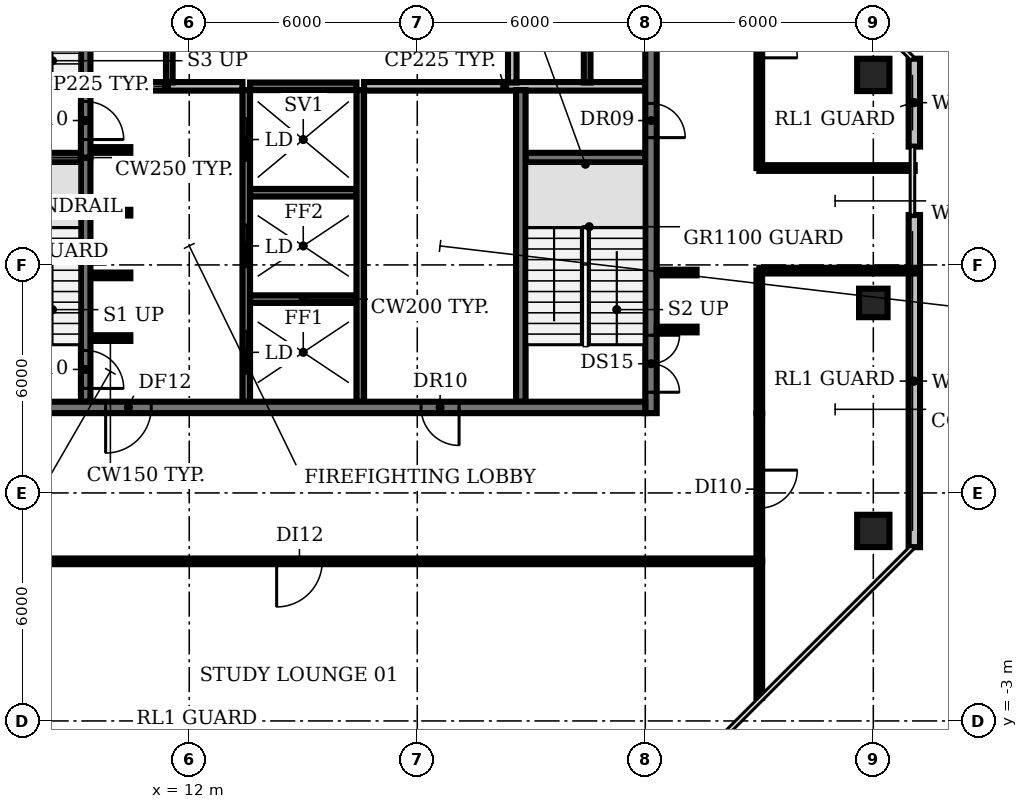
"""IFC4 building model, lengths in metres.
Left out: names, types, materials, properties, quantities, classifications, styles, units other than length and angle.
Written with IfcOpenShell. Run it as: python <this file> out.ifc"""

import sys

from ifc_helpers import new_model, si_unit, direction, frame, frame_2d, origin, origin_2d, place, context, subcontext, project, spatial, rectangle, circle, extrude, element, fill, save


model = new_model("IFC4")
c1 = context("Model", 3, precision=1e-05, world=origin(), true_north=direction((0.0, 1.0)))
c2 = subcontext(c1, "Body", "Model", "MODEL_VIEW")
j1 = project(units=[si_unit("LENGTHUNIT", "METRE"), si_unit("PLANEANGLEUNIT", "RADIAN")], contexts=[c1])
p1 = place(None, origin())
s1 = spatial("IfcSite", under=j1, at=p1, CompositionType="ELEMENT")
p2 = place(p1, origin())
s2 = spatial("IfcBuilding", under=s1, at=p2, CompositionType="ELEMENT")
p3 = place(p2, frame((0.0, 0.0, 285.2)))
s3 = spatial("IfcBuildingStorey", under=s2, at=p3, CompositionType="ELEMENT", Elevation=285.2)
p4 = place(p3, frame((30.0, 2.0, 0.0), z_axis=(0.0, 0.0, 1.0), x_axis=(1.0, 0.0, 0.0)))
e1 = element("IfcColumn", 1, at=p4, inside=s3, PredefinedType="COLUMN", context=c2, shape_type="SweptSolid", body=[
    extrude(circle(Radius=0.425, at=origin_2d()), origin(), (0.0, 0.0, 1.0), 3.85),
])
p5 = place(p3, frame((30.0, 8.0, 0.0), z_axis=(0.0, 0.0, 1.0), x_axis=(1.0, 0.0, 0.0)))
e2 = element("IfcColumn", 2, at=p5, inside=s3, PredefinedType="COLUMN", context=c2, shape_type="SweptSolid", body=[
    extrude(rectangle(XDim=0.75, YDim=0.75, at=origin_2d()), origin(), (0.0, 0.0, 1.0), 3.85),
])
p6 = place(p3, frame((30.0, 14.0, 0.0), z_axis=(0.0, 0.0, 1.0), x_axis=(1.0, 0.0, 0.0)))
e3 = element("IfcColumn", 3, at=p6, inside=s3, PredefinedType="COLUMN", context=c2, shape_type="SweptSolid", body=[
    extrude(circle(Radius=0.425, at=origin_2d()), origin(), (0.0, 0.0, 1.0), 3.85),
])
p7 = place(p3, frame((31.08, 1.573, 0.0), z_axis=(0.0, 0.0, 1.0), x_axis=(0.0, 1.0, 0.0)))
e4 = element("IfcWall", 4, at=p7, inside=s3, PredefinedType="SOLIDWALL", context=c2, shape_type="SweptSolid", body=[
    extrude(rectangle(XDim=8.74, YDim=0.3, at=frame_2d((4.37, 0.0))), origin(), (0.0, 0.0, 1.0), 3.85),
])
p8 = place(p3, frame((31.08, 12.113, 0.0), z_axis=(0.0, 0.0, 1.0), x_axis=(0.0, 1.0, 0.0)))
e5 = element("IfcWall", 5, at=p8, inside=s3, PredefinedType="SOLIDWALL", context=c2, shape_type="SweptSolid", body=[
    extrude(rectangle(XDim=2.313, YDim=0.3, at=frame_2d((1.157, 0.0))), origin(), (0.0, 0.0, 1.0), 3.85),
])
p9 = place(p3, frame((9.4, 7.075, 0.0), z_axis=(0.0, 0.0, 1.0), x_axis=(1.0, 0.0, 0.0)))
e6 = element("IfcWall", 6, at=p9, inside=s3, PredefinedType="SHEAR", context=c2, shape_type="SweptSolid", body=[
    extrude(rectangle(XDim=1.05, YDim=0.15, at=frame_2d((0.525, 0.0))), origin(), (0.0, 0.0, 1.0), 3.85),
])
p10 = place(p3, frame((13.6, 8.1, 0.0), z_axis=(0.0, 0.0, 1.0), x_axis=(1.0, 0.0, 0.0)))
e7 = element("IfcWall", 7, at=p10, inside=s3, PredefinedType="SHEAR", context=c2, shape_type="SweptSolid", body=[
    extrude(rectangle(XDim=2.8, YDim=0.2, at=frame_2d((1.4, 0.0))), origin(), (0.0, 0.0, 1.0), 3.85),
])
for number, where, z_axis, x_axis in (
    (8, (9.4, 8.725, 0.0), (0.0, 0.0, 1.0), (1.0, 0.0, 0.0)),
    (9, (9.4, 10.375, 0.0), (0.0, 0.0, 1.0), (1.0, 0.0, 0.0)),
):
    element("IfcWall", number, at=place(p3, frame(where, z_axis=z_axis, x_axis=x_axis)), inside=s3, PredefinedType="SHEAR", context=c2, shape_type="SweptSolid", body=[
        extrude(rectangle(XDim=1.05, YDim=0.15, at=frame_2d((0.525, 0.0))), origin(), (0.0, 0.0, 1.0), 3.85),
    ])
p11 = place(p3, frame((13.6, 10.9, 0.0), z_axis=(0.0, 0.0, 1.0), x_axis=(1.0, 0.0, 0.0)))
e10 = element("IfcWall", 10, at=p11, inside=s3, PredefinedType="SHEAR", context=c2, shape_type="SweptSolid", body=[
    extrude(rectangle(XDim=2.8, YDim=0.2, at=frame_2d((1.4, 0.0))), origin(), (0.0, 0.0, 1.0), 3.85),
])
for number, where, z_axis, x_axis in (
    (11, (6.0, 11.825, 0.0), (0.0, 0.0, 1.0), (1.0, 0.0, 0.0)),
    (12, (20.85, 11.825, 0.0), (0.0, 0.0, 1.0), (1.0, 0.0, 0.0)),
):
    element("IfcWall", number, at=place(p3, frame(where, z_axis=z_axis, x_axis=x_axis)), inside=s3, PredefinedType="SHEAR", context=c2, shape_type="SweptSolid", body=[
        extrude(rectangle(XDim=3.15, YDim=0.25, at=frame_2d((1.575, 0.0))), origin(), (0.0, 0.0, 1.0), 3.85),
    ])
p12 = place(p3, frame((9.4, 12.025, 0.0), z_axis=(0.0, 0.0, 1.0), x_axis=(1.0, 0.0, 0.0)))
e13 = element("IfcWall", 13, at=p12, inside=s3, PredefinedType="SHEAR", context=c2, shape_type="SweptSolid", body=[
    extrude(rectangle(XDim=1.05, YDim=0.15, at=frame_2d((0.525, 0.0))), origin(), (0.0, 0.0, 1.0), 3.85),
])
p13 = place(p3, frame((9.4, 13.7, 0.0), z_axis=(0.0, 0.0, 1.0), x_axis=(1.0, 0.0, 0.0)))
e14 = element("IfcWall", 14, at=p13, inside=s3, PredefinedType="PARTITIONING", context=c2, shape_type="SweptSolid", body=[
    extrude(rectangle(XDim=4.0, YDim=0.225, at=frame_2d((2.0, 0.0))), origin(), (0.0, 0.0, 1.0), 3.85),
])
p14 = place(p3, frame((13.6, 13.7, 0.0), z_axis=(0.0, 0.0, 1.0), x_axis=(1.0, 0.0, 0.0)))
e15 = element("IfcWall", 15, at=p14, inside=s3, PredefinedType="SHEAR", context=c2, shape_type="SweptSolid", body=[
    extrude(rectangle(XDim=2.8, YDim=0.2, at=frame_2d((1.4, 0.0))), origin(), (0.0, 0.0, 1.0), 3.85),
])
p15 = place(p3, frame((16.6, 13.7, 0.0), z_axis=(0.0, 0.0, 1.0), x_axis=(1.0, 0.0, 0.0)))
e16 = element("IfcWall", 16, at=p15, inside=s3, PredefinedType="PARTITIONING", context=c2, shape_type="SweptSolid", body=[
    extrude(rectangle(XDim=7.4, YDim=0.225, at=frame_2d((3.7, 0.0))), origin(), (0.0, 0.0, 1.0), 3.85),
])
p16 = place(p3, frame((9.275, 11.825, 0.0), z_axis=(0.0, 0.0, 1.0), x_axis=(0.0, -1.0, 0.0)))
e17 = element("IfcWall", 17, at=p16, inside=s3, PredefinedType="SHEAR", context=c2, shape_type="SweptSolid", body=[
    extrude(rectangle(XDim=6.425, YDim=0.25, at=frame_2d((3.212, 0.0))), origin(), (0.0, 0.0, 1.0), 3.85),
])
p17 = place(p16, frame((5.075, 0.0, 0.0)))
e18 = element("IfcOpeningElement", 18, at=p17, cuts=e17, PredefinedType="OPENING", context=c2, shape_type="SweptSolid", body=[
    extrude(rectangle(XDim=1.0, YDim=2.1, at=frame_2d((0.5, 1.05))), frame((0.0, 0.135, 0.0), z_axis=(0.0, -1.0, 0.0), x_axis=(1.0, 0.0, 0.0)), (0.0, 0.0, 1.0), 0.27),
])
p18 = place(p3, frame((9.275, 18.375, 0.0), z_axis=(0.0, 0.0, 1.0), x_axis=(0.0, -1.0, 0.0)))
e19 = element("IfcWall", 19, at=p18, inside=s3, PredefinedType="SHEAR", context=c2, shape_type="SweptSolid", body=[
    extrude(rectangle(XDim=6.55, YDim=0.25, at=frame_2d((3.275, 0.0))), origin(), (0.0, 0.0, 1.0), 3.85),
])
p19 = place(p18, frame((5.075, 0.0, 0.0)))
e20 = element("IfcOpeningElement", 20, at=p19, cuts=e19, PredefinedType="OPENING", context=c2, shape_type="SweptSolid", body=[
    extrude(rectangle(XDim=1.0, YDim=2.1, at=frame_2d((0.5, 1.05))), frame((0.0, 0.135, 0.0), z_axis=(0.0, -1.0, 0.0), x_axis=(1.0, 0.0, 0.0)), (0.0, 0.0, 1.0), 0.27),
])
p20 = place(p3, frame((11.475, 13.8, 0.0), z_axis=(0.0, 0.0, 1.0), x_axis=(0.0, 1.0, 0.0)))
e21 = element("IfcWall", 21, at=p20, inside=s3, PredefinedType="PARTITIONING", context=c2, shape_type="SweptSolid", body=[
    extrude(rectangle(XDim=2.6, YDim=0.175, at=frame_2d((1.3, 0.0))), origin(), (0.0, 0.0, 1.0), 3.85),
])
p21 = place(p3, frame((13.5, 5.4, 0.0), z_axis=(0.0, 0.0, 1.0), x_axis=(0.0, 1.0, 0.0)))
e22 = element("IfcWall", 22, at=p21, inside=s3, PredefinedType="SHEAR", context=c2, shape_type="SweptSolid", body=[
    extrude(rectangle(XDim=8.2, YDim=0.2, at=frame_2d((4.1, 0.0))), origin(), (0.0, 0.0, 1.0), 3.85),
])
p22 = place(p21, frame((0.75, 0.0, 0.0)))
e23 = element("IfcOpeningElement", 23, at=p22, cuts=e22, PredefinedType="OPENING", context=c2, shape_type="SweptSolid", body=[
    extrude(rectangle(XDim=1.1, YDim=2.1, at=frame_2d((0.55, 1.05))), frame((0.0, 0.11, 0.0), z_axis=(0.0, -1.0, 0.0), x_axis=(1.0, 0.0, 0.0)), (0.0, 0.0, 1.0), 0.22),
])
p23 = place(p21, frame((3.55, 0.0, 0.0)))
e24 = element("IfcOpeningElement", 24, at=p23, cuts=e22, PredefinedType="OPENING", context=c2, shape_type="SweptSolid", body=[
    extrude(rectangle(XDim=1.1, YDim=2.1, at=frame_2d((0.55, 1.05))), frame((0.0, 0.11, 0.0), z_axis=(0.0, -1.0, 0.0), x_axis=(1.0, 0.0, 0.0)), (0.0, 0.0, 1.0), 0.22),
])
p24 = place(p21, frame((6.35, 0.0, 0.0)))
e25 = element("IfcOpeningElement", 25, at=p24, cuts=e22, PredefinedType="OPENING", context=c2, shape_type="SweptSolid", body=[
    extrude(rectangle(XDim=1.1, YDim=2.1, at=frame_2d((0.55, 1.05))), frame((0.0, 0.11, 0.0), z_axis=(0.0, -1.0, 0.0), x_axis=(1.0, 0.0, 0.0)), (0.0, 0.0, 1.0), 0.22),
])
p25 = place(p3, frame((16.5, 5.4, 0.0), z_axis=(0.0, 0.0, 1.0), x_axis=(0.0, 1.0, 0.0)))
e26 = element("IfcWall", 26, at=p25, inside=s3, PredefinedType="SHEAR", context=c2, shape_type="SweptSolid", body=[
    extrude(rectangle(XDim=8.2, YDim=0.2, at=frame_2d((4.1, 0.0))), origin(), (0.0, 0.0, 1.0), 3.85),
])
p26 = place(p3, frame((20.5, 13.8, 0.0), z_axis=(0.0, 0.0, 1.0), x_axis=(0.0, 1.0, 0.0)))
e27 = element("IfcWall", 27, at=p26, inside=s3, PredefinedType="PARTITIONING", context=c2, shape_type="SweptSolid", body=[
    extrude(rectangle(XDim=2.6, YDim=0.225, at=frame_2d((1.3, 0.0))), origin(), (0.0, 0.0, 1.0), 3.85),
])
p27 = place(p3, frame((20.725, 5.4, 0.0), z_axis=(0.0, 0.0, 1.0), x_axis=(0.0, 1.0, 0.0)))
e28 = element("IfcWall", 28, at=p27, inside=s3, PredefinedType="SHEAR", context=c2, shape_type="SweptSolid", body=[
    extrude(rectangle(XDim=8.2, YDim=0.25, at=frame_2d((4.1, 0.0))), origin(), (0.0, 0.0, 1.0), 3.85),
])
p28 = place(p3, frame((22.47, 13.8, 0.0), z_axis=(0.0, 0.0, 1.0), x_axis=(0.0, 1.0, 0.0)))
e29 = element("IfcWall", 29, at=p28, inside=s3, PredefinedType="PARTITIONING", context=c2, shape_type="SweptSolid", body=[
    extrude(rectangle(XDim=2.6, YDim=0.175, at=frame_2d((1.3, 0.0))), origin(), (0.0, 0.0, 1.0), 3.85),
])
p29 = place(p3, frame((24.15, 25.655, 0.0), z_axis=(0.0, 0.0, 1.0), x_axis=(0.0, -1.0, 0.0)))
e30 = element("IfcWall", 30, at=p29, inside=s3, PredefinedType="SHEAR", context=c2, shape_type="SweptSolid", body=[
    extrude(rectangle(XDim=20.555, YDim=0.3, at=frame_2d((10.277, 0.0))), origin(), (0.0, 0.0, 1.0), 3.85),
])
p30 = place(p29, frame((18.505, 0.0, 0.0)))
e31 = element("IfcOpeningElement", 31, at=p30, cuts=e30, PredefinedType="OPENING", context=c2, shape_type="SweptSolid", body=[
    extrude(rectangle(XDim=1.5, YDim=2.1, at=frame_2d((0.75, 1.05))), frame((0.0, 0.16, 0.0), z_axis=(0.0, -1.0, 0.0), x_axis=(1.0, 0.0, 0.0)), (0.0, 0.0, 1.0), 0.32),
])
p31 = place(p29, frame((12.405, 0.0, 0.0)))
e32 = element("IfcOpeningElement", 32, at=p31, cuts=e30, PredefinedType="OPENING", context=c2, shape_type="SweptSolid", body=[
    extrude(rectangle(XDim=0.9, YDim=2.1, at=frame_2d((0.45, 1.05))), frame((0.0, 0.16, 0.0), z_axis=(0.0, -1.0, 0.0), x_axis=(1.0, 0.0, 0.0)), (0.0, 0.0, 1.0), 0.32),
])
p32 = place(p29, frame((6.405, 0.0, 0.0)))
e33 = element("IfcOpeningElement", 33, at=p32, cuts=e30, PredefinedType="OPENING", context=c2, shape_type="SweptSolid", body=[
    extrude(rectangle(XDim=2.0, YDim=2.1, at=frame_2d((1.0, 1.05))), frame((0.0, 0.16, 0.0), z_axis=(0.0, -1.0, 0.0), x_axis=(1.0, 0.0, 0.0)), (0.0, 0.0, 1.0), 0.32),
])
p33 = place(p3, frame((24.0, 5.25, 0.0), z_axis=(0.0, 0.0, 1.0), x_axis=(-1.0, 0.0, 0.0)))
e34 = element("IfcWall", 34, at=p33, inside=s3, PredefinedType="SHEAR", context=c2, shape_type="SweptSolid", body=[
    extrude(rectangle(XDim=18.0, YDim=0.3, at=frame_2d((9.0, 0.0))), origin(), (0.0, 0.0, 1.0), 3.85),
])
p34 = place(p33, frame((13.0, 0.0, 0.0)))
e35 = element("IfcOpeningElement", 35, at=p34, cuts=e34, PredefinedType="OPENING", context=c2, shape_type="SweptSolid", body=[
    extrude(rectangle(XDim=1.2, YDim=2.1, at=frame_2d((0.6, 1.05))), frame((0.0, 0.16, 0.0), z_axis=(0.0, -1.0, 0.0), x_axis=(1.0, 0.0, 0.0)), (0.0, 0.0, 1.0), 0.32),
])
p35 = place(p33, frame((4.9, 0.0, 0.0)))
e36 = element("IfcOpeningElement", 36, at=p35, cuts=e34, PredefinedType="OPENING", context=c2, shape_type="SweptSolid", body=[
    extrude(rectangle(XDim=1.0, YDim=2.1, at=frame_2d((0.5, 1.05))), frame((0.0, 0.16, 0.0), z_axis=(0.0, -1.0, 0.0), x_axis=(1.0, 0.0, 0.0)), (0.0, 0.0, 1.0), 0.32),
])
for number, where, z_axis, x_axis in (
    (37, (24.3, 7.3, 0.0), (0.0, 0.0, 1.0), (1.0, 0.0, 0.0)),
    (38, (24.3, 8.8, 0.0), (0.0, 0.0, 1.0), (1.0, 0.0, 0.0)),
):
    element("IfcWall", number, at=place(p3, frame(where, z_axis=z_axis, x_axis=x_axis)), inside=s3, PredefinedType="PARTITIONING", context=c2, shape_type="SweptSolid", body=[
        extrude(rectangle(XDim=1.05, YDim=0.15, at=frame_2d((0.525, 0.0))), origin(), (0.0, 0.0, 1.0), 2.9),
    ])
p36 = place(p3, frame((27.0, -2.39, 0.0), z_axis=(0.0, 0.0, 1.0), x_axis=(0.0, 1.0, 0.0)))
e39 = element("IfcWall", 39, at=p36, inside=s3, PredefinedType="PARTITIONING", context=c2, shape_type="SweptSolid", body=[
    extrude(rectangle(XDim=3.59, YDim=0.15, at=frame_2d((1.795, 0.0))), origin(), (0.0, 0.0, 1.0), 2.9),
])
p37 = place(p3, frame((27.0, 1.2, 0.0), z_axis=(0.0, 0.0, 1.0), x_axis=(-1.0, 0.0, 0.0)))
e40 = element("IfcWall", 40, at=p37, inside=s3, PredefinedType="PARTITIONING", context=c2, shape_type="SweptSolid", body=[
    extrude(rectangle(XDim=24.0, YDim=0.15, at=frame_2d((12.0, 0.0))), origin(), (0.0, 0.0, 1.0), 2.9),
])
p38 = place(p37, frame((11.5, 0.0, 0.0)))
e41 = element("IfcOpeningElement", 41, at=p38, cuts=e40, PredefinedType="OPENING", context=c2, shape_type="SweptSolid", body=[
    extrude(rectangle(XDim=1.2, YDim=2.1, at=frame_2d((0.6, 1.05))), frame((0.0, 0.085, 0.0), z_axis=(0.0, -1.0, 0.0), x_axis=(1.0, 0.0, 0.0)), (0.0, 0.0, 1.0), 0.17),
])
p39 = place(p3, frame((27.0, 5.1, 0.0), z_axis=(0.0, 0.0, 1.0), x_axis=(0.0, -1.0, 0.0)))
e42 = element("IfcWall", 42, at=p39, inside=s3, PredefinedType="PARTITIONING", context=c2, shape_type="SweptSolid", body=[
    extrude(rectangle(XDim=3.9, YDim=0.15, at=frame_2d((1.95, 0.0))), origin(), (0.0, 0.0, 1.0), 2.9),
])
p40 = place(p39, frame((1.5, 0.0, 0.0)))
e43 = element("IfcOpeningElement", 43, at=p40, cuts=e42, PredefinedType="OPENING", context=c2, shape_type="SweptSolid", body=[
    extrude(rectangle(XDim=1.0, YDim=2.1, at=frame_2d((0.5, 1.05))), frame((0.0, 0.085, 0.0), z_axis=(0.0, -1.0, 0.0), x_axis=(1.0, 0.0, 0.0)), (0.0, 0.0, 1.0), 0.17),
])
p41 = place(p3, frame((27.0, 5.1, 0.0), z_axis=(0.0, 0.0, 1.0), x_axis=(0.0, 1.0, 0.0)))
e44 = element("IfcWall", 44, at=p41, inside=s3, PredefinedType="PARTITIONING", context=c2, shape_type="SweptSolid", body=[
    extrude(rectangle(XDim=3.75, YDim=0.15, at=frame_2d((1.875, 0.0))), origin(), (0.0, 0.0, 1.0), 2.9),
])
for number, where, z_axis, x_axis in (
    (45, (27.0, 8.85, 0.0), (0.0, 0.0, 1.0), (1.0, 0.0, 0.0)),
    (46, (27.0, 11.55, 0.0), (0.0, 0.0, 1.0), (1.0, 0.0, 0.0)),
):
    element("IfcWall", number, at=place(p3, frame(where, z_axis=z_axis, x_axis=x_axis)), inside=s3, PredefinedType="PARTITIONING", context=c2, shape_type="SweptSolid", body=[
        extrude(rectangle(XDim=4.09, YDim=0.15, at=frame_2d((2.045, 0.0))), origin(), (0.0, 0.0, 1.0), 2.9),
    ])
p42 = place(p3, frame((27.0, 18.38, 0.0), z_axis=(0.0, 0.0, 1.0), x_axis=(0.0, -1.0, 0.0)))
e47 = element("IfcWall", 47, at=p42, inside=s3, PredefinedType="PARTITIONING", context=c2, shape_type="SweptSolid", body=[
    extrude(rectangle(XDim=6.83, YDim=0.15, at=frame_2d((3.415, 0.0))), origin(), (0.0, 0.0, 1.0), 2.9),
])
p43 = place(p42, frame((2.93, 0.0, 0.0)))
e48 = element("IfcOpeningElement", 48, at=p43, cuts=e47, PredefinedType="OPENING", context=c2, shape_type="SweptSolid", body=[
    extrude(rectangle(XDim=1.0, YDim=2.1, at=frame_2d((0.5, 1.05))), frame((0.0, 0.085, 0.0), z_axis=(0.0, -1.0, 0.0), x_axis=(1.0, 0.0, 0.0)), (0.0, 0.0, 1.0), 0.17),
])
p44 = place(p17, origin())
e49 = element("IfcDoor", 49, at=p44, inside=s3, OperationType="SINGLE_SWING_RIGHT", PredefinedType="DOOR", context=c2, shape_type="SweptSolid", body=[
    extrude(rectangle(XDim=1.0, YDim=2.1, at=frame_2d((0.5, 1.05))), frame((0.0, 0.025, 0.0), z_axis=(0.0, -1.0, 0.0), x_axis=(1.0, 0.0, 0.0)), (0.0, 0.0, 1.0), 0.05),
])
fill(e18, e49)
p45 = place(p19, origin())
e50 = element("IfcDoor", 50, at=p45, inside=s3, OperationType="SINGLE_SWING_RIGHT", PredefinedType="DOOR", context=c2, shape_type="SweptSolid", body=[
    extrude(rectangle(XDim=1.0, YDim=2.1, at=frame_2d((0.5, 1.05))), frame((0.0, 0.025, 0.0), z_axis=(0.0, -1.0, 0.0), x_axis=(1.0, 0.0, 0.0)), (0.0, 0.0, 1.0), 0.05),
])
fill(e20, e50)
p46 = place(p22, origin())
e51 = element("IfcDoor", 51, at=p46, inside=s3, OperationType="DOUBLE_DOOR_SLIDING", PredefinedType="DOOR", context=c2, shape_type="SweptSolid", body=[
    extrude(rectangle(XDim=1.1, YDim=2.1, at=frame_2d((0.55, 1.05))), frame((0.0, 0.025, 0.0), z_axis=(0.0, -1.0, 0.0), x_axis=(1.0, 0.0, 0.0)), (0.0, 0.0, 1.0), 0.05),
])
fill(e23, e51)
p47 = place(p23, origin())
e52 = element("IfcDoor", 52, at=p47, inside=s3, OperationType="DOUBLE_DOOR_SLIDING", PredefinedType="DOOR", context=c2, shape_type="SweptSolid", body=[
    extrude(rectangle(XDim=1.1, YDim=2.1, at=frame_2d((0.55, 1.05))), frame((0.0, 0.025, 0.0), z_axis=(0.0, -1.0, 0.0), x_axis=(1.0, 0.0, 0.0)), (0.0, 0.0, 1.0), 0.05),
])
fill(e24, e52)
p48 = place(p24, origin())
e53 = element("IfcDoor", 53, at=p48, inside=s3, OperationType="DOUBLE_DOOR_SLIDING", PredefinedType="DOOR", context=c2, shape_type="SweptSolid", body=[
    extrude(rectangle(XDim=1.1, YDim=2.1, at=frame_2d((0.55, 1.05))), frame((0.0, 0.025, 0.0), z_axis=(0.0, -1.0, 0.0), x_axis=(1.0, 0.0, 0.0)), (0.0, 0.0, 1.0), 0.05),
])
fill(e25, e53)
p49 = place(p30, origin())
e54 = element("IfcDoor", 54, at=p49, inside=s3, OperationType="DOUBLE_DOOR_SINGLE_SWING", PredefinedType="DOOR", context=c2, shape_type="SweptSolid", body=[
    extrude(rectangle(XDim=1.5, YDim=2.1, at=frame_2d((0.75, 1.05))), frame((0.0, 0.025, 0.0), z_axis=(0.0, -1.0, 0.0), x_axis=(1.0, 0.0, 0.0)), (0.0, 0.0, 1.0), 0.05),
])
fill(e31, e54)
p50 = place(p31, origin())
e55 = element("IfcDoor", 55, at=p50, inside=s3, OperationType="SINGLE_SWING_RIGHT", PredefinedType="DOOR", context=c2, shape_type="SweptSolid", body=[
    extrude(rectangle(XDim=0.9, YDim=2.1, at=frame_2d((0.45, 1.05))), frame((0.0, 0.025, 0.0), z_axis=(0.0, -1.0, 0.0), x_axis=(1.0, 0.0, 0.0)), (0.0, 0.0, 1.0), 0.05),
])
fill(e32, e55)
p51 = place(p34, origin())
e56 = element("IfcDoor", 56, at=p51, inside=s3, OperationType="SINGLE_SWING_RIGHT", PredefinedType="DOOR", context=c2, shape_type="SweptSolid", body=[
    extrude(rectangle(XDim=1.2, YDim=2.1, at=frame_2d((0.6, 1.05))), frame((0.0, 0.025, 0.0), z_axis=(0.0, -1.0, 0.0), x_axis=(1.0, 0.0, 0.0)), (0.0, 0.0, 1.0), 0.05),
])
fill(e35, e56)
p52 = place(p35, origin())
e57 = element("IfcDoor", 57, at=p52, inside=s3, OperationType="SINGLE_SWING_LEFT", PredefinedType="DOOR", context=c2, shape_type="SweptSolid", body=[
    extrude(rectangle(XDim=1.0, YDim=2.1, at=frame_2d((0.5, 1.05))), frame((0.0, 0.025, 0.0), z_axis=(0.0, -1.0, 0.0), x_axis=(1.0, 0.0, 0.0)), (0.0, 0.0, 1.0), 0.05),
])
fill(e36, e57)
p53 = place(p38, origin())
e58 = element("IfcDoor", 58, at=p53, inside=s3, OperationType="SINGLE_SWING_RIGHT", PredefinedType="DOOR", context=c2, shape_type="SweptSolid", body=[
    extrude(rectangle(XDim=1.2, YDim=2.1, at=frame_2d((0.6, 1.05))), frame((0.0, 0.025, 0.0), z_axis=(0.0, -1.0, 0.0), x_axis=(1.0, 0.0, 0.0)), (0.0, 0.0, 1.0), 0.05),
])
fill(e41, e58)
p54 = place(p40, origin())
e59 = element("IfcDoor", 59, at=p54, inside=s3, OperationType="SINGLE_SWING_LEFT", PredefinedType="DOOR", context=c2, shape_type="SweptSolid", body=[
    extrude(rectangle(XDim=1.0, YDim=2.1, at=frame_2d((0.5, 1.05))), frame((0.0, 0.025, 0.0), z_axis=(0.0, -1.0, 0.0), x_axis=(1.0, 0.0, 0.0)), (0.0, 0.0, 1.0), 0.05),
])
fill(e43, e59)
p55 = place(p43, origin())
e60 = element("IfcDoor", 60, at=p55, inside=s3, OperationType="SINGLE_SWING_RIGHT", PredefinedType="DOOR", context=c2, shape_type="SweptSolid", body=[
    extrude(rectangle(XDim=1.0, YDim=2.1, at=frame_2d((0.5, 1.05))), frame((0.0, 0.025, 0.0), z_axis=(0.0, -1.0, 0.0), x_axis=(1.0, 0.0, 0.0)), (0.0, 0.0, 1.0), 0.05),
])
fill(e48, e60)
save(model, sys.argv[1])
